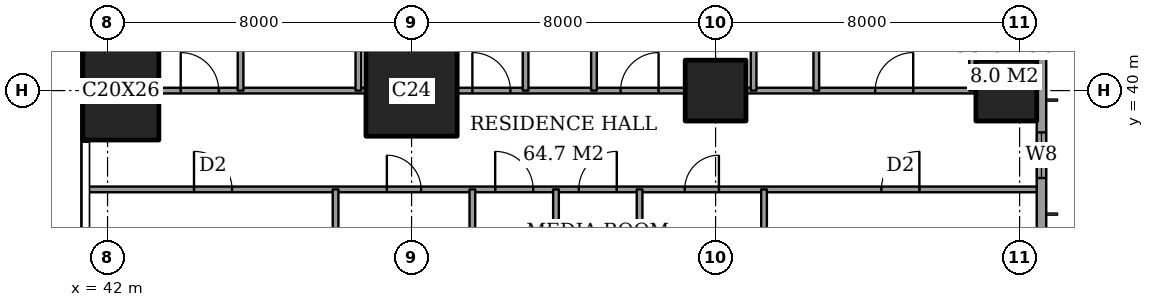
"""IFC4 building model, lengths in metres.
Left out: names, types, materials, properties, quantities, classifications, styles, units other than length and angle.
Written with IfcOpenShell. Run it as: python <this file> out.ifc"""

import sys

from ifc_helpers import new_model, si_unit, direction, frame, frame_2d, origin, origin_2d, place, context, subcontext, project, spatial, rectangle, extrude, element, fill, save


model = new_model("IFC4")
c1 = context("Model", 3, precision=1e-05, world=origin(), true_north=direction((0.0, 1.0)))
c2 = subcontext(c1, "Body", "Model", "MODEL_VIEW")
j1 = project(units=[si_unit("LENGTHUNIT", "METRE"), si_unit("PLANEANGLEUNIT", "RADIAN")], contexts=[c1])
p1 = place(None, origin())
s1 = spatial("IfcSite", under=j1, at=p1, CompositionType="ELEMENT")
p2 = place(p1, origin())
s2 = spatial("IfcBuilding", under=s1, at=p2, CompositionType="ELEMENT")
p3 = place(p2, frame((0.0, 0.0, 230.4)))
s3 = spatial("IfcBuildingStorey", under=s2, at=p3, CompositionType="ELEMENT", Elevation=230.4)
p4 = place(p3, frame((42.35, 40.0, 0.0), z_axis=(0.0, 0.0, 1.0), x_axis=(1.0, 0.0, 0.0)))
e1 = element("IfcColumn", 1, at=p4, inside=s3, PredefinedType="COLUMN", context=c2, shape_type="SweptSolid", body=[
    extrude(rectangle(XDim=2.0, YDim=2.6, at=origin_2d()), origin(), (0.0, 0.0, 1.0), 3.6),
])
p5 = place(p3, frame((50.0, 40.0, 0.0), z_axis=(0.0, 0.0, 1.0), x_axis=(1.0, 0.0, 0.0)))
e2 = element("IfcColumn", 2, at=p5, inside=s3, PredefinedType="COLUMN", context=c2, shape_type="SweptSolid", body=[
    extrude(rectangle(XDim=2.4, YDim=2.4, at=origin_2d()), origin(), (0.0, 0.0, 1.0), 3.6),
])
for number, where, z_axis, x_axis in (
    (3, (58.0, 40.0, 0.0), (0.0, 0.0, 1.0), (1.0, 0.0, 0.0)),
    (4, (65.65, 40.0, 0.0), (0.0, 0.0, 1.0), (1.0, 0.0, 0.0)),
):
    element("IfcColumn", number, at=place(p3, frame(where, z_axis=z_axis, x_axis=x_axis)), inside=s3, PredefinedType="COLUMN", context=c2, shape_type="SweptSolid", body=[
        extrude(rectangle(XDim=1.6, YDim=1.6, at=origin_2d()), origin(), (0.0, 0.0, 1.0), 3.6),
    ])
p6 = place(p3, frame((66.575, 3.175, 0.0), z_axis=(0.0, 0.0, 1.0), x_axis=(0.0, 1.0, 0.0)))
e5 = element("IfcWall", 5, at=p6, inside=s3, PredefinedType="SOLIDWALL", context=c2, shape_type="SweptSolid", body=[
    extrude(rectangle(XDim=41.65, YDim=0.25, at=frame_2d((20.825, 0.0))), origin(), (0.0, 0.0, 1.0), 3.6),
])
p7 = place(p6, frame((0.875, 0.0, 0.6)))
e6 = element("IfcOpeningElement", 6, at=p7, cuts=e5, PredefinedType="OPENING", context=c2, shape_type="SweptSolid", body=[
    extrude(rectangle(XDim=2.4, YDim=2.0, at=frame_2d((1.2, 1.0))), frame((0.0, 0.135, 0.0), z_axis=(0.0, -1.0, 0.0), x_axis=(1.0, 0.0, 0.0)), (0.0, 0.0, 1.0), 0.27),
])
p8 = place(p6, frame((6.225, 0.0, 0.6)))
e7 = element("IfcOpeningElement", 7, at=p8, cuts=e5, PredefinedType="OPENING", context=c2, shape_type="SweptSolid", body=[
    extrude(rectangle(XDim=1.2, YDim=2.0, at=frame_2d((0.6, 1.0))), frame((0.0, 0.135, 0.0), z_axis=(0.0, -1.0, 0.0), x_axis=(1.0, 0.0, 0.0)), (0.0, 0.0, 1.0), 0.27),
])
p9 = place(p6, frame((8.725, 0.0, 0.6)))
e8 = element("IfcOpeningElement", 8, at=p9, cuts=e5, PredefinedType="OPENING", context=c2, shape_type="SweptSolid", body=[
    extrude(rectangle(XDim=2.4, YDim=2.0, at=frame_2d((1.2, 1.0))), frame((0.0, 0.135, 0.0), z_axis=(0.0, -1.0, 0.0), x_axis=(1.0, 0.0, 0.0)), (0.0, 0.0, 1.0), 0.27),
])
p10 = place(p6, frame((15.725, 0.0, 0.6)))
e9 = element("IfcOpeningElement", 9, at=p10, cuts=e5, PredefinedType="OPENING", context=c2, shape_type="SweptSolid", body=[
    extrude(rectangle(XDim=2.4, YDim=2.0, at=frame_2d((1.2, 1.0))), frame((0.0, 0.135, 0.0), z_axis=(0.0, -1.0, 0.0), x_axis=(1.0, 0.0, 0.0)), (0.0, 0.0, 1.0), 0.27),
])
p11 = place(p6, frame((23.525, 0.0, 0.6)))
e10 = element("IfcOpeningElement", 10, at=p11, cuts=e5, PredefinedType="OPENING", context=c2, shape_type="SweptSolid", body=[
    extrude(rectangle(XDim=2.4, YDim=2.0, at=frame_2d((1.2, 1.0))), frame((0.0, 0.135, 0.0), z_axis=(0.0, -1.0, 0.0), x_axis=(1.0, 0.0, 0.0)), (0.0, 0.0, 1.0), 0.27),
])
p12 = place(p6, frame((30.725, 0.0, 0.6)))
e11 = element("IfcOpeningElement", 11, at=p12, cuts=e5, PredefinedType="OPENING", context=c2, shape_type="SweptSolid", body=[
    extrude(rectangle(XDim=2.4, YDim=2.0, at=frame_2d((1.2, 1.0))), frame((0.0, 0.135, 0.0), z_axis=(0.0, -1.0, 0.0), x_axis=(1.0, 0.0, 0.0)), (0.0, 0.0, 1.0), 0.27),
])
p13 = place(p6, frame((34.525, 0.0, 0.6)))
e12 = element("IfcOpeningElement", 12, at=p13, cuts=e5, PredefinedType="OPENING", context=c2, shape_type="SweptSolid", body=[
    extrude(rectangle(XDim=1.2, YDim=2.0, at=frame_2d((0.6, 1.0))), frame((0.0, 0.135, 0.0), z_axis=(0.0, -1.0, 0.0), x_axis=(1.0, 0.0, 0.0)), (0.0, 0.0, 1.0), 0.27),
])
p14 = place(p6, frame((38.375, 0.0, 0.6)))
e13 = element("IfcOpeningElement", 13, at=p14, cuts=e5, PredefinedType="OPENING", context=c2, shape_type="SweptSolid", body=[
    extrude(rectangle(XDim=2.4, YDim=2.0, at=frame_2d((1.2, 1.0))), frame((0.0, 0.135, 0.0), z_axis=(0.0, -1.0, 0.0), x_axis=(1.0, 0.0, 0.0)), (0.0, 0.0, 1.0), 0.27),
])
p15 = place(p3, frame((41.439, 37.4, 0.0), z_axis=(0.0, 0.0, 1.0), x_axis=(1.0, 0.0, 0.0)))
e14 = element("IfcWall", 14, at=p15, inside=s3, PredefinedType="PARTITIONING", context=c2, shape_type="SweptSolid", body=[
    extrude(rectangle(XDim=25.011, YDim=0.15, at=frame_2d((12.505, 0.0))), origin(), (0.0, 0.0, 1.0), 3.35),
])
p16 = place(p15, frame((10.761, 0.0, 0.0)))
e15 = element("IfcOpeningElement", 15, at=p16, cuts=e14, PredefinedType="OPENING", context=c2, shape_type="SweptSolid", body=[
    extrude(rectangle(XDim=1.0, YDim=2.1, at=frame_2d((0.5, 1.05))), frame((0.0, 0.085, 0.0), z_axis=(0.0, -1.0, 0.0), x_axis=(1.0, 0.0, 0.0)), (0.0, 0.0, 1.0), 0.17),
])
p17 = place(p15, frame((20.924, 0.0, 0.0)))
e16 = element("IfcOpeningElement", 16, at=p17, cuts=e14, PredefinedType="OPENING", context=c2, shape_type="SweptSolid", body=[
    extrude(rectangle(XDim=1.0, YDim=2.1, at=frame_2d((0.5, 1.05))), frame((0.0, 0.085, 0.0), z_axis=(0.0, -1.0, 0.0), x_axis=(1.0, 0.0, 0.0)), (0.0, 0.0, 1.0), 0.17),
])
p18 = place(p15, frame((15.749, 0.0, 0.0)))
e17 = element("IfcOpeningElement", 17, at=p18, cuts=e14, PredefinedType="OPENING", context=c2, shape_type="SweptSolid", body=[
    extrude(rectangle(XDim=0.9, YDim=2.1, at=frame_2d((0.45, 1.05))), frame((0.0, 0.085, 0.0), z_axis=(0.0, -1.0, 0.0), x_axis=(1.0, 0.0, 0.0)), (0.0, 0.0, 1.0), 0.17),
])
p19 = place(p15, frame((12.961, 0.0, 0.0)))
e18 = element("IfcOpeningElement", 18, at=p19, cuts=e14, PredefinedType="OPENING", context=c2, shape_type="SweptSolid", body=[
    extrude(rectangle(XDim=1.0, YDim=2.1, at=frame_2d((0.5, 1.05))), frame((0.0, 0.085, 0.0), z_axis=(0.0, -1.0, 0.0), x_axis=(1.0, 0.0, 0.0)), (0.0, 0.0, 1.0), 0.17),
])
p20 = place(p15, frame((7.911, 0.0, 0.0)))
e19 = element("IfcOpeningElement", 19, at=p20, cuts=e14, PredefinedType="OPENING", context=c2, shape_type="SweptSolid", body=[
    extrude(rectangle(XDim=0.9, YDim=2.1, at=frame_2d((0.45, 1.05))), frame((0.0, 0.085, 0.0), z_axis=(0.0, -1.0, 0.0), x_axis=(1.0, 0.0, 0.0)), (0.0, 0.0, 1.0), 0.17),
])
p21 = place(p15, frame((2.836, 0.0, 0.0)))
e20 = element("IfcOpeningElement", 20, at=p21, cuts=e14, PredefinedType="OPENING", context=c2, shape_type="SweptSolid", body=[
    extrude(rectangle(XDim=1.0, YDim=2.1, at=frame_2d((0.5, 1.05))), frame((0.0, 0.085, 0.0), z_axis=(0.0, -1.0, 0.0), x_axis=(1.0, 0.0, 0.0)), (0.0, 0.0, 1.0), 0.17),
])
p22 = place(p3, frame((43.35, 40.0, 0.0), z_axis=(0.0, 0.0, 1.0), x_axis=(1.0, 0.0, 0.0)))
e21 = element("IfcWall", 21, at=p22, inside=s3, PredefinedType="PARTITIONING", context=c2, shape_type="SweptSolid", body=[
    extrude(rectangle(XDim=5.45, YDim=0.15, at=frame_2d((2.725, 0.0))), origin(), (0.0, 0.0, 1.0), 3.35),
])
p23 = place(p22, frame((0.575, 0.0, 0.0)))
e22 = element("IfcOpeningElement", 22, at=p23, cuts=e21, PredefinedType="OPENING", context=c2, shape_type="SweptSolid", body=[
    extrude(rectangle(XDim=1.0, YDim=2.1, at=frame_2d((0.5, 1.05))), frame((0.0, 0.085, 0.0), z_axis=(0.0, -1.0, 0.0), x_axis=(1.0, 0.0, 0.0)), (0.0, 0.0, 1.0), 0.17),
])
p24 = place(p3, frame((51.2, 40.0, 0.0), z_axis=(0.0, 0.0, 1.0), x_axis=(1.0, 0.0, 0.0)))
e23 = element("IfcWall", 23, at=p24, inside=s3, PredefinedType="PARTITIONING", context=c2, shape_type="SweptSolid", body=[
    extrude(rectangle(XDim=6.0, YDim=0.15, at=frame_2d((3.0, 0.0))), origin(), (0.0, 0.0, 1.0), 3.35),
])
p25 = place(p24, frame((4.3, 0.0, 0.0)))
e24 = element("IfcOpeningElement", 24, at=p25, cuts=e23, PredefinedType="OPENING", context=c2, shape_type="SweptSolid", body=[
    extrude(rectangle(XDim=1.0, YDim=2.1, at=frame_2d((0.5, 1.05))), frame((0.0, 0.085, 0.0), z_axis=(0.0, -1.0, 0.0), x_axis=(1.0, 0.0, 0.0)), (0.0, 0.0, 1.0), 0.17),
])
p26 = place(p24, frame((0.4, 0.0, 0.0)))
e25 = element("IfcOpeningElement", 25, at=p26, cuts=e23, PredefinedType="OPENING", context=c2, shape_type="SweptSolid", body=[
    extrude(rectangle(XDim=1.0, YDim=2.1, at=frame_2d((0.5, 1.05))), frame((0.0, 0.085, 0.0), z_axis=(0.0, -1.0, 0.0), x_axis=(1.0, 0.0, 0.0)), (0.0, 0.0, 1.0), 0.17),
])
p27 = place(p3, frame((58.8, 40.0, 0.0), z_axis=(0.0, 0.0, 1.0), x_axis=(1.0, 0.0, 0.0)))
e26 = element("IfcWall", 26, at=p27, inside=s3, PredefinedType="PARTITIONING", context=c2, shape_type="SweptSolid", body=[
    extrude(rectangle(XDim=6.05, YDim=0.15, at=frame_2d((3.025, 0.0))), origin(), (0.0, 0.0, 1.0), 3.35),
])
p28 = place(p27, frame((3.4, 0.0, 0.0)))
e27 = element("IfcOpeningElement", 27, at=p28, cuts=e26, PredefinedType="OPENING", context=c2, shape_type="SweptSolid", body=[
    extrude(rectangle(XDim=1.0, YDim=2.1, at=frame_2d((0.5, 1.05))), frame((0.0, 0.085, 0.0), z_axis=(0.0, -1.0, 0.0), x_axis=(1.0, 0.0, 0.0)), (0.0, 0.0, 1.0), 0.17),
])
p29 = place(p3, frame((45.5, 40.0, 0.0), z_axis=(0.0, 0.0, 1.0), x_axis=(0.0, 1.0, 0.0)))
e28 = element("IfcWall", 28, at=p29, inside=s3, PredefinedType="PARTITIONING", context=c2, shape_type="SweptSolid", body=[
    extrude(rectangle(XDim=8.45, YDim=0.15, at=frame_2d((4.225, 0.0))), origin(), (0.0, 0.0, 1.0), 3.35),
])
p30 = place(p3, frame((48.0, 28.0, 0.0), z_axis=(0.0, 0.0, 1.0), x_axis=(0.0, 1.0, 0.0)))
e29 = element("IfcWall", 29, at=p30, inside=s3, PredefinedType="PARTITIONING", context=c2, shape_type="SweptSolid", body=[
    extrude(rectangle(XDim=9.4, YDim=0.15, at=frame_2d((4.7, 0.0))), origin(), (0.0, 0.0, 1.0), 3.35),
])
p31 = place(p30, frame((0.5, 0.0, 0.0)))
e30 = element("IfcOpeningElement", 30, at=p31, cuts=e29, PredefinedType="OPENING", context=c2, shape_type="SweptSolid", body=[
    extrude(rectangle(XDim=1.0, YDim=2.1, at=frame_2d((0.5, 1.05))), frame((0.0, 0.085, 0.0), z_axis=(0.0, -1.0, 0.0), x_axis=(1.0, 0.0, 0.0)), (0.0, 0.0, 1.0), 0.17),
])
p32 = place(p3, frame((48.6, 40.0, 0.0), z_axis=(0.0, 0.0, 1.0), x_axis=(0.0, 1.0, 0.0)))
e31 = element("IfcWall", 31, at=p32, inside=s3, PredefinedType="PARTITIONING", context=c2, shape_type="SweptSolid", body=[
    extrude(rectangle(XDim=8.45, YDim=0.15, at=frame_2d((4.225, 0.0))), origin(), (0.0, 0.0, 1.0), 3.35),
])
p33 = place(p32, frame((3.775, 0.0, 0.0)))
e32 = element("IfcOpeningElement", 32, at=p33, cuts=e31, PredefinedType="OPENING", context=c2, shape_type="SweptSolid", body=[
    extrude(rectangle(XDim=0.9, YDim=2.1, at=frame_2d((0.45, 1.05))), frame((0.0, 0.085, 0.0), z_axis=(0.0, -1.0, 0.0), x_axis=(1.0, 0.0, 0.0)), (0.0, 0.0, 1.0), 0.17),
])
p34 = place(p3, frame((51.6, 30.0, 0.0), z_axis=(0.0, 0.0, 1.0), x_axis=(0.0, 1.0, 0.0)))
e33 = element("IfcWall", 33, at=p34, inside=s3, PredefinedType="PARTITIONING", context=c2, shape_type="SweptSolid", body=[
    extrude(rectangle(XDim=7.4, YDim=0.15, at=frame_2d((3.7, 0.0))), origin(), (0.0, 0.0, 1.0), 3.35),
])
p35 = place(p3, frame((53.0, 40.0, 0.0), z_axis=(0.0, 0.0, 1.0), x_axis=(0.0, 1.0, 0.0)))
e34 = element("IfcWall", 34, at=p35, inside=s3, PredefinedType="PARTITIONING", context=c2, shape_type="SweptSolid", body=[
    extrude(rectangle(XDim=8.45, YDim=0.15, at=frame_2d((4.225, 0.0))), origin(), (0.0, 0.0, 1.0), 3.35),
])
p36 = place(p3, frame((53.8, 30.0, 0.0), z_axis=(0.0, 0.0, 1.0), x_axis=(0.0, 1.0, 0.0)))
e35 = element("IfcWall", 35, at=p36, inside=s3, PredefinedType="PARTITIONING", context=c2, shape_type="SweptSolid", body=[
    extrude(rectangle(XDim=7.4, YDim=0.15, at=frame_2d((3.7, 0.0))), origin(), (0.0, 0.0, 1.0), 3.35),
])
p37 = place(p3, frame((54.8, 40.0, 0.0), z_axis=(0.0, 0.0, 1.0), x_axis=(0.0, 1.0, 0.0)))
e36 = element("IfcWall", 36, at=p37, inside=s3, PredefinedType="PARTITIONING", context=c2, shape_type="SweptSolid", body=[
    extrude(rectangle(XDim=8.45, YDim=0.15, at=frame_2d((4.225, 0.0))), origin(), (0.0, 0.0, 1.0), 3.35),
])
p38 = place(p37, frame((3.775, 0.0, 0.0)))
e37 = element("IfcOpeningElement", 37, at=p38, cuts=e36, PredefinedType="OPENING", context=c2, shape_type="SweptSolid", body=[
    extrude(rectangle(XDim=0.9, YDim=2.1, at=frame_2d((0.45, 1.05))), frame((0.0, 0.085, 0.0), z_axis=(0.0, -1.0, 0.0), x_axis=(1.0, 0.0, 0.0)), (0.0, 0.0, 1.0), 0.17),
])
p39 = place(p3, frame((56.0, 28.0, 0.0), z_axis=(0.0, 0.0, 1.0), x_axis=(0.0, 1.0, 0.0)))
e38 = element("IfcWall", 38, at=p39, inside=s3, PredefinedType="PARTITIONING", context=c2, shape_type="SweptSolid", body=[
    extrude(rectangle(XDim=9.4, YDim=0.15, at=frame_2d((4.7, 0.0))), origin(), (0.0, 0.0, 1.0), 3.35),
])
p40 = place(p39, frame((0.5, 0.0, 0.0)))
e39 = element("IfcOpeningElement", 39, at=p40, cuts=e38, PredefinedType="OPENING", context=c2, shape_type="SweptSolid", body=[
    extrude(rectangle(XDim=1.0, YDim=2.1, at=frame_2d((0.5, 1.05))), frame((0.0, 0.085, 0.0), z_axis=(0.0, -1.0, 0.0), x_axis=(1.0, 0.0, 0.0)), (0.0, 0.0, 1.0), 0.17),
])
p41 = place(p3, frame((59.0, 40.0, 0.0), z_axis=(0.0, 0.0, 1.0), x_axis=(0.0, 1.0, 0.0)))
e40 = element("IfcWall", 40, at=p41, inside=s3, PredefinedType="PARTITIONING", context=c2, shape_type="SweptSolid", body=[
    extrude(rectangle(XDim=8.45, YDim=0.15, at=frame_2d((4.225, 0.0))), origin(), (0.0, 0.0, 1.0), 3.35),
])
p42 = place(p3, frame((59.275, 33.2, 0.0), z_axis=(0.0, 0.0, 1.0), x_axis=(0.0, 1.0, 0.0)))
e41 = element("IfcWall", 41, at=p42, inside=s3, PredefinedType="PARTITIONING", context=c2, shape_type="SweptSolid", body=[
    extrude(rectangle(XDim=4.2, YDim=0.15, at=frame_2d((2.1, 0.0))), origin(), (0.0, 0.0, 1.0), 3.35),
])
p43 = place(p3, frame((60.65, 40.0, 0.0), z_axis=(0.0, 0.0, 1.0), x_axis=(0.0, 1.0, 0.0)))
e42 = element("IfcWall", 42, at=p43, inside=s3, PredefinedType="PARTITIONING", context=c2, shape_type="SweptSolid", body=[
    extrude(rectangle(XDim=8.45, YDim=0.15, at=frame_2d((4.225, 0.0))), origin(), (0.0, 0.0, 1.0), 3.35),
])
p44 = place(p43, frame((3.775, 0.0, 0.0)))
e43 = element("IfcOpeningElement", 43, at=p44, cuts=e42, PredefinedType="OPENING", context=c2, shape_type="SweptSolid", body=[
    extrude(rectangle(XDim=0.9, YDim=2.1, at=frame_2d((0.45, 1.05))), frame((0.0, 0.085, 0.0), z_axis=(0.0, -1.0, 0.0), x_axis=(1.0, 0.0, 0.0)), (0.0, 0.0, 1.0), 0.17),
])
p45 = place(p3, frame((64.75, 40.0, 0.0), z_axis=(0.0, 0.0, 1.0), x_axis=(0.0, 1.0, 0.0)))
e44 = element("IfcWall", 44, at=p45, inside=s3, PredefinedType="PARTITIONING", context=c2, shape_type="SweptSolid", body=[
    extrude(rectangle(XDim=4.7, YDim=0.15, at=frame_2d((2.35, 0.0))), origin(), (0.0, 0.0, 1.0), 3.35),
])
p46 = place(p45, frame((1.9, 0.0, 0.0)))
e45 = element("IfcOpeningElement", 45, at=p46, cuts=e44, PredefinedType="OPENING", context=c2, shape_type="SweptSolid", body=[
    extrude(rectangle(XDim=0.9, YDim=2.1, at=frame_2d((0.45, 1.05))), frame((0.0, 0.085, 0.0), z_axis=(0.0, -1.0, 0.0), x_axis=(1.0, 0.0, 0.0)), (0.0, 0.0, 1.0), 0.17),
])
p47 = place(p13, origin())
e46 = element("IfcWindow", 46, at=p47, inside=s3, PartitioningType="SINGLE_PANEL", PredefinedType="WINDOW", context=c2, shape_type="SweptSolid", body=[
    extrude(rectangle(XDim=1.2, YDim=2.0, at=frame_2d((0.6, 1.0))), frame((0.0, 0.03, 0.0), z_axis=(0.0, -1.0, 0.0), x_axis=(1.0, 0.0, 0.0)), (0.0, 0.0, 1.0), 0.06),
])
fill(e12, e46)
p48 = place(p28, origin())
e47 = element("IfcDoor", 47, at=p48, inside=s3, OperationType="SINGLE_SWING_LEFT", PredefinedType="DOOR", context=c2, shape_type="SweptSolid", body=[
    extrude(rectangle(XDim=1.0, YDim=2.1, at=frame_2d((0.5, 1.05))), frame((0.0, 0.025, 0.0), z_axis=(0.0, -1.0, 0.0), x_axis=(1.0, 0.0, 0.0)), (0.0, 0.0, 1.0), 0.05),
])
fill(e27, e47)
p49 = place(p25, origin())
e48 = element("IfcDoor", 48, at=p49, inside=s3, OperationType="SINGLE_SWING_LEFT", PredefinedType="DOOR", context=c2, shape_type="SweptSolid", body=[
    extrude(rectangle(XDim=1.0, YDim=2.1, at=frame_2d((0.5, 1.05))), frame((0.0, 0.025, 0.0), z_axis=(0.0, -1.0, 0.0), x_axis=(1.0, 0.0, 0.0)), (0.0, 0.0, 1.0), 0.05),
])
fill(e24, e48)
p50 = place(p26, origin())
e49 = element("IfcDoor", 49, at=p50, inside=s3, OperationType="SINGLE_SWING_RIGHT", PredefinedType="DOOR", context=c2, shape_type="SweptSolid", body=[
    extrude(rectangle(XDim=1.0, YDim=2.1, at=frame_2d((0.5, 1.05))), frame((0.0, 0.025, 0.0), z_axis=(0.0, -1.0, 0.0), x_axis=(1.0, 0.0, 0.0)), (0.0, 0.0, 1.0), 0.05),
])
fill(e25, e49)
p51 = place(p23, origin())
e50 = element("IfcDoor", 50, at=p51, inside=s3, OperationType="SINGLE_SWING_RIGHT", PredefinedType="DOOR", context=c2, shape_type="SweptSolid", body=[
    extrude(rectangle(XDim=1.0, YDim=2.1, at=frame_2d((0.5, 1.05))), frame((0.0, 0.025, 0.0), z_axis=(0.0, -1.0, 0.0), x_axis=(1.0, 0.0, 0.0)), (0.0, 0.0, 1.0), 0.05),
])
fill(e22, e50)
p52 = place(p16, origin())
e51 = element("IfcDoor", 51, at=p52, inside=s3, OperationType="SINGLE_SWING_RIGHT", PredefinedType="DOOR", context=c2, shape_type="SweptSolid", body=[
    extrude(rectangle(XDim=1.0, YDim=2.1, at=frame_2d((0.5, 1.05))), frame((0.0, 0.025, 0.0), z_axis=(0.0, -1.0, 0.0), x_axis=(1.0, 0.0, 0.0)), (0.0, 0.0, 1.0), 0.05),
])
fill(e15, e51)
p53 = place(p17, origin())
e52 = element("IfcDoor", 52, at=p53, inside=s3, OperationType="SINGLE_SWING_LEFT", PredefinedType="DOOR", context=c2, shape_type="SweptSolid", body=[
    extrude(rectangle(XDim=1.0, YDim=2.1, at=frame_2d((0.5, 1.05))), frame((0.0, 0.025, 0.0), z_axis=(0.0, -1.0, 0.0), x_axis=(1.0, 0.0, 0.0)), (0.0, 0.0, 1.0), 0.05),
])
fill(e16, e52)
p54 = place(p18, origin())
e53 = element("IfcDoor", 53, at=p54, inside=s3, OperationType="SINGLE_SWING_LEFT", PredefinedType="DOOR", context=c2, shape_type="SweptSolid", body=[
    extrude(rectangle(XDim=0.9, YDim=2.1, at=frame_2d((0.45, 1.05))), frame((0.0, 0.025, 0.0), z_axis=(0.0, -1.0, 0.0), x_axis=(1.0, 0.0, 0.0)), (0.0, 0.0, 1.0), 0.05),
])
fill(e17, e53)
p55 = place(p19, origin())
e54 = element("IfcDoor", 54, at=p55, inside=s3, OperationType="SINGLE_SWING_LEFT", PredefinedType="DOOR", context=c2, shape_type="SweptSolid", body=[
    extrude(rectangle(XDim=1.0, YDim=2.1, at=frame_2d((0.5, 1.05))), frame((0.0, 0.025, 0.0), z_axis=(0.0, -1.0, 0.0), x_axis=(1.0, 0.0, 0.0)), (0.0, 0.0, 1.0), 0.05),
])
fill(e18, e54)
p56 = place(p20, origin())
e55 = element("IfcDoor", 55, at=p56, inside=s3, OperationType="SINGLE_SWING_RIGHT", PredefinedType="DOOR", context=c2, shape_type="SweptSolid", body=[
    extrude(rectangle(XDim=0.9, YDim=2.1, at=frame_2d((0.45, 1.05))), frame((0.0, 0.025, 0.0), z_axis=(0.0, -1.0, 0.0), x_axis=(1.0, 0.0, 0.0)), (0.0, 0.0, 1.0), 0.05),
])
fill(e19, e55)
p57 = place(p21, origin())
e56 = element("IfcDoor", 56, at=p57, inside=s3, OperationType="SINGLE_SWING_RIGHT", PredefinedType="DOOR", context=c2, shape_type="SweptSolid", body=[
    extrude(rectangle(XDim=1.0, YDim=2.1, at=frame_2d((0.5, 1.05))), frame((0.0, 0.025, 0.0), z_axis=(0.0, -1.0, 0.0), x_axis=(1.0, 0.0, 0.0)), (0.0, 0.0, 1.0), 0.05),
])
fill(e20, e56)
save(model, sys.argv[1])
